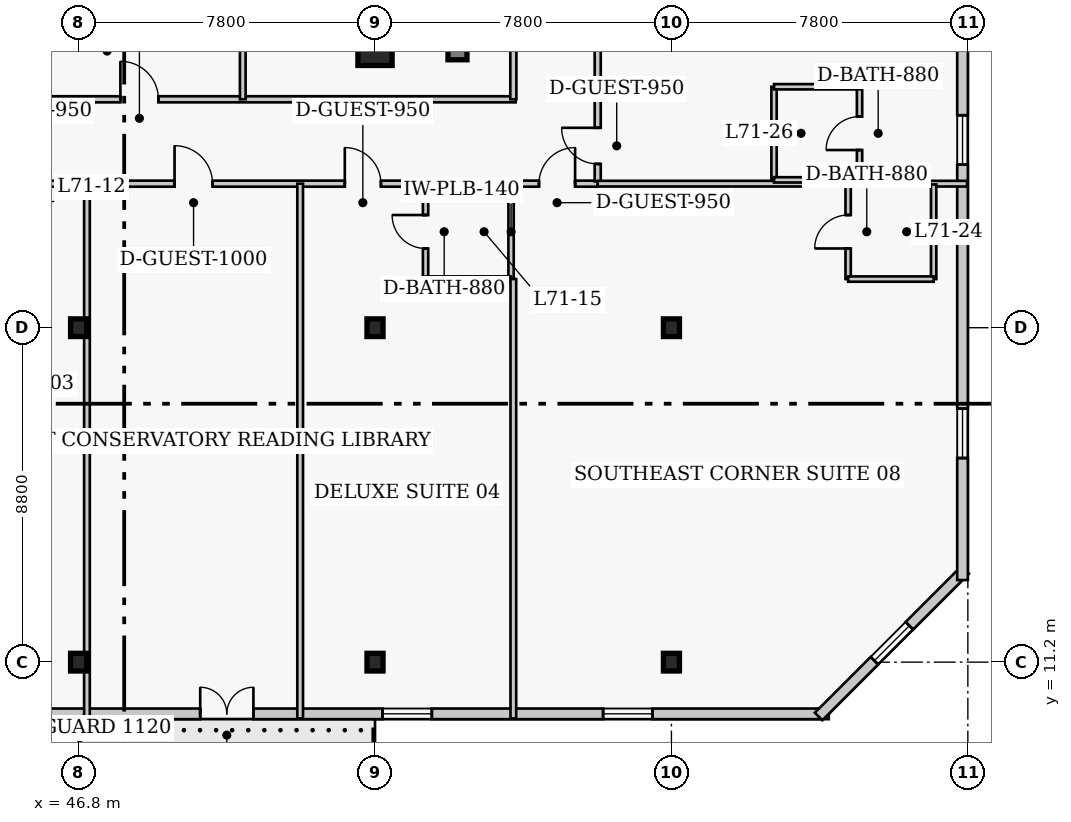
"""IFC4 building model, lengths in metres.
Left out: names, types, materials, properties, quantities, classifications, styles, units other than length and angle.
Written with IfcOpenShell. Run it as: python <this file> out.ifc"""

import sys

from ifc_helpers import new_model, si_unit, direction, frame, frame_2d, origin, origin_2d, place, context, subcontext, project, spatial, rectangle, i_section, extrude, element, fill, save


model = new_model("IFC4")
c1 = context("Model", 3, precision=1e-05, world=origin(), true_north=direction((0.0, 1.0)))
c2 = subcontext(c1, "Body", "Model", "MODEL_VIEW")
j1 = project(units=[si_unit("LENGTHUNIT", "METRE"), si_unit("PLANEANGLEUNIT", "RADIAN")], contexts=[c1])
p1 = place(None, origin())
s1 = spatial("IfcSite", under=j1, at=p1, CompositionType="ELEMENT")
p2 = place(p1, origin())
s2 = spatial("IfcBuilding", under=s1, at=p2, CompositionType="ELEMENT")
p3 = place(p2, frame((0.0, 0.0, 285.4)))
s3 = spatial("IfcBuildingStorey", under=s2, at=p3, CompositionType="ELEMENT", Elevation=285.4)
p4 = place(p3, frame((56.77, 27.05, 0.0), z_axis=(0.0, 0.0, 1.0), x_axis=(0.0, 1.0, 0.0)))
e1 = element("IfcWall", 1, at=p4, inside=s3, PredefinedType="SHEAR", context=c2, shape_type="SweptSolid", body=[
    extrude(rectangle(XDim=13.52, YDim=0.5, at=frame_2d((6.76, 0.0))), origin(), (0.0, 0.0, 1.0), 4.0),
])
for number, where, z_axis, x_axis in (
    (2, (46.8, 11.2, 0.0), (0.0, 0.0, 1.0), (1.0, 0.0, 0.0)),
    (3, (46.8, 20.0, 0.0), (0.0, 0.0, 1.0), (1.0, 0.0, 0.0)),
    (4, (54.6, 11.2, 0.0), (0.0, 0.0, 1.0), (1.0, 0.0, 0.0)),
    (5, (54.6, 20.0, 0.0), (0.0, 0.0, 1.0), (1.0, 0.0, 0.0)),
    (6, (62.4, 11.2, 0.0), (0.0, 0.0, 1.0), (1.0, 0.0, 0.0)),
    (7, (62.4, 20.0, 0.0), (0.0, 0.0, 1.0), (1.0, 0.0, 0.0)),
):
    element("IfcColumn", number, at=place(p3, frame(where, z_axis=z_axis, x_axis=x_axis)), inside=s3, PredefinedType="COLUMN", context=c2, shape_type="SweptSolid", body=[
        extrude(i_section(OverallWidth=0.422, OverallDepth=0.465, WebThickness=0.045, FlangeThickness=0.073, FilletRadius=0.017, at=origin_2d()), origin(), (0.0, 0.0, 1.0), 4.0),
    ])
p5 = place(p3, frame((54.6, 27.35, 0.0), z_axis=(0.0, 0.0, 1.0), x_axis=(1.0, 0.0, 0.0)))
e8 = element("IfcColumn", 8, at=p5, inside=s3, PredefinedType="COLUMN", context=c2, shape_type="SweptSolid", body=[
    extrude(rectangle(XDim=0.9, YDim=0.9, at=origin_2d()), origin(), (0.0, 0.0, 1.0), 4.0),
])
p6 = place(p3, frame((41.71, 9.84, 0.0), z_axis=(0.0, 0.0, 1.0), x_axis=(1.0, 0.0, 0.0)))
e9 = element("IfcWall", 9, at=p6, inside=s3, PredefinedType="SOLIDWALL", context=c2, shape_type="SweptSolid", body=[
    extrude(rectangle(XDim=24.83, YDim=0.28, at=frame_2d((12.415, 0.0))), origin(), (0.0, 0.0, 1.0), 3.76),
])
p7 = place(p6, frame((8.29, 0.0, 0.0)))
e10 = element("IfcOpeningElement", 10, at=p7, cuts=e9, PredefinedType="OPENING", context=c2, shape_type="SweptSolid", body=[
    extrude(rectangle(XDim=1.4, YDim=2.15, at=frame_2d((0.7, 1.075))), frame((0.0, 0.15, 0.0), z_axis=(0.0, -1.0, 0.0), x_axis=(1.0, 0.0, 0.0)), (0.0, 0.0, 1.0), 0.3),
])
p8 = place(p6, frame((2.838, 0.0, 0.85)))
e11 = element("IfcOpeningElement", 11, at=p8, cuts=e9, PredefinedType="OPENING", context=c2, shape_type="SweptSolid", body=[
    extrude(rectangle(XDim=1.3, YDim=1.7, at=frame_2d((0.65, 0.85))), frame((0.0, 0.15, 0.0), z_axis=(0.0, -1.0, 0.0), x_axis=(1.0, 0.0, 0.0)), (0.0, 0.0, 1.0), 0.3),
])
p9 = place(p6, frame((18.892, 0.0, 0.85)))
e12 = element("IfcOpeningElement", 12, at=p9, cuts=e9, PredefinedType="OPENING", context=c2, shape_type="SweptSolid", body=[
    extrude(rectangle(XDim=1.3, YDim=1.7, at=frame_2d((0.65, 0.85))), frame((0.0, 0.15, 0.0), z_axis=(0.0, -1.0, 0.0), x_axis=(1.0, 0.0, 0.0)), (0.0, 0.0, 1.0), 0.3),
])
p10 = place(p6, frame((13.085, 0.0, 0.85)))
e13 = element("IfcOpeningElement", 13, at=p10, cuts=e9, PredefinedType="OPENING", context=c2, shape_type="SweptSolid", body=[
    extrude(rectangle(XDim=1.3, YDim=1.7, at=frame_2d((0.65, 0.85))), frame((0.0, 0.15, 0.0), z_axis=(0.0, -1.0, 0.0), x_axis=(1.0, 0.0, 0.0)), (0.0, 0.0, 1.0), 0.3),
])
p11 = place(p3, frame((66.273, 9.771, 0.0), z_axis=(0.0, 0.0, 1.0), x_axis=(0.707129162587, 0.707084399077, 0.0)))
e14 = element("IfcWall", 14, at=p11, inside=s3, PredefinedType="SOLIDWALL", context=c2, shape_type="SweptSolid", body=[
    extrude(rectangle(XDim=5.454, YDim=0.28, at=frame_2d((2.727, 0.0))), origin(), (0.0, 0.0, 1.0), 3.76),
])
p12 = place(p11, frame((2.077, 0.0, 0.85)))
e15 = element("IfcOpeningElement", 15, at=p12, cuts=e14, PredefinedType="OPENING", context=c2, shape_type="SweptSolid", body=[
    extrude(rectangle(XDim=1.3, YDim=1.7, at=frame_2d((0.65, 0.85))), frame((0.0, 0.15, 0.0), z_axis=(0.0, -1.0, 0.0), x_axis=(1.0, 0.0, 0.0)), (0.0, 0.0, 1.0), 0.3),
])
p13 = place(p3, frame((70.06, 13.36, 0.0), z_axis=(0.0, 0.0, 1.0), x_axis=(0.0, 1.0, 0.0)))
e16 = element("IfcWall", 16, at=p13, inside=s3, PredefinedType="SOLIDWALL", context=c2, shape_type="SweptSolid", body=[
    extrude(rectangle(XDim=30.88, YDim=0.28, at=frame_2d((15.44, 0.0))), origin(), (0.0, 0.0, 1.0), 3.76),
])
p14 = place(p13, frame((3.21, 0.0, 0.85)))
e17 = element("IfcOpeningElement", 17, at=p14, cuts=e16, PredefinedType="OPENING", context=c2, shape_type="SweptSolid", body=[
    extrude(rectangle(XDim=1.3, YDim=1.7, at=frame_2d((0.65, 0.85))), frame((0.0, 0.15, 0.0), z_axis=(0.0, -1.0, 0.0), x_axis=(1.0, 0.0, 0.0)), (0.0, 0.0, 1.0), 0.3),
])
p15 = place(p13, frame((10.93, 0.0, 0.85)))
e18 = element("IfcOpeningElement", 18, at=p15, cuts=e16, PredefinedType="OPENING", context=c2, shape_type="SweptSolid", body=[
    extrude(rectangle(XDim=1.3, YDim=1.7, at=frame_2d((0.65, 0.85))), frame((0.0, 0.15, 0.0), z_axis=(0.0, -1.0, 0.0), x_axis=(1.0, 0.0, 0.0)), (0.0, 0.0, 1.0), 0.3),
])
p16 = place(p13, frame((18.65, 0.0, 0.85)))
e19 = element("IfcOpeningElement", 19, at=p16, cuts=e16, PredefinedType="OPENING", context=c2, shape_type="SweptSolid", body=[
    extrude(rectangle(XDim=1.3, YDim=1.7, at=frame_2d((0.65, 0.85))), frame((0.0, 0.15, 0.0), z_axis=(0.0, -1.0, 0.0), x_axis=(1.0, 0.0, 0.0)), (0.0, 0.0, 1.0), 0.3),
])
p17 = place(p13, frame((26.37, 0.0, 0.85)))
e20 = element("IfcOpeningElement", 20, at=p17, cuts=e16, PredefinedType="OPENING", context=c2, shape_type="SweptSolid", body=[
    extrude(rectangle(XDim=1.3, YDim=1.7, at=frame_2d((0.65, 0.85))), frame((0.0, 0.15, 0.0), z_axis=(0.0, -1.0, 0.0), x_axis=(1.0, 0.0, 0.0)), (0.0, 0.0, 1.0), 0.3),
])
p18 = place(p3, frame((35.85, 26.01, 0.0), z_axis=(0.0, 0.0, 1.0), x_axis=(1.0, 0.0, 0.0)))
e21 = element("IfcWall", 21, at=p18, inside=s3, PredefinedType="PARTITIONING", context=c2, shape_type="SweptSolid", body=[
    extrude(rectangle(XDim=22.45, YDim=0.16, at=frame_2d((11.225, 0.0))), origin(), (0.0, 0.0, 1.0), 3.76),
])
p19 = place(p18, frame((4.55, 0.0, 0.0)))
e22 = element("IfcOpeningElement", 22, at=p19, cuts=e21, PredefinedType="OPENING", context=c2, shape_type="SweptSolid", body=[
    extrude(rectangle(XDim=1.0, YDim=2.15, at=frame_2d((0.5, 1.075))), frame((0.0, 0.09, 0.0), z_axis=(0.0, -1.0, 0.0), x_axis=(1.0, 0.0, 0.0)), (0.0, 0.0, 1.0), 0.18),
])
p20 = place(p18, frame((12.05, 0.0, 0.0)))
e23 = element("IfcOpeningElement", 23, at=p20, cuts=e21, PredefinedType="OPENING", context=c2, shape_type="SweptSolid", body=[
    extrude(rectangle(XDim=1.0, YDim=2.15, at=frame_2d((0.5, 1.075))), frame((0.0, 0.09, 0.0), z_axis=(0.0, -1.0, 0.0), x_axis=(1.0, 0.0, 0.0)), (0.0, 0.0, 1.0), 0.18),
])
p21 = place(p3, frame((35.8, 23.79, 0.0), z_axis=(0.0, 0.0, 1.0), x_axis=(1.0, 0.0, 0.0)))
e24 = element("IfcWall", 24, at=p21, inside=s3, PredefinedType="PARTITIONING", context=c2, shape_type="SweptSolid", body=[
    extrude(rectangle(XDim=24.66, YDim=0.16, at=frame_2d((12.33, 0.0))), origin(), (0.0, 0.0, 1.0), 3.76),
])
p22 = place(p21, frame((0.88, 0.0, 0.0)))
e25 = element("IfcOpeningElement", 25, at=p22, cuts=e24, PredefinedType="OPENING", context=c2, shape_type="SweptSolid", body=[
    extrude(rectangle(XDim=0.95, YDim=2.1, at=frame_2d((0.475, 1.05))), frame((0.0, 0.09, 0.0), z_axis=(0.0, -1.0, 0.0), x_axis=(1.0, 0.0, 0.0)), (0.0, 0.0, 1.0), 0.18),
])
p23 = place(p21, frame((9.095, 0.0, 0.0)))
e26 = element("IfcOpeningElement", 26, at=p23, cuts=e24, PredefinedType="OPENING", context=c2, shape_type="SweptSolid", body=[
    extrude(rectangle(XDim=0.95, YDim=2.1, at=frame_2d((0.475, 1.05))), frame((0.0, 0.09, 0.0), z_axis=(0.0, -1.0, 0.0), x_axis=(1.0, 0.0, 0.0)), (0.0, 0.0, 1.0), 0.18),
])
p24 = place(p21, frame((13.525, 0.0, 0.0)))
e27 = element("IfcOpeningElement", 27, at=p24, cuts=e24, PredefinedType="OPENING", context=c2, shape_type="SweptSolid", body=[
    extrude(rectangle(XDim=1.0, YDim=2.15, at=frame_2d((0.5, 1.075))), frame((0.0, 0.09, 0.0), z_axis=(0.0, -1.0, 0.0), x_axis=(1.0, 0.0, 0.0)), (0.0, 0.0, 1.0), 0.18),
])
p25 = place(p21, frame((18.005, 0.0, 0.0)))
e28 = element("IfcOpeningElement", 28, at=p25, cuts=e24, PredefinedType="OPENING", context=c2, shape_type="SweptSolid", body=[
    extrude(rectangle(XDim=0.95, YDim=2.1, at=frame_2d((0.475, 1.05))), frame((0.0, 0.09, 0.0), z_axis=(0.0, -1.0, 0.0), x_axis=(1.0, 0.0, 0.0)), (0.0, 0.0, 1.0), 0.18),
])
p26 = place(p21, frame((23.115, 0.0, 0.0)))
e29 = element("IfcOpeningElement", 29, at=p26, cuts=e24, PredefinedType="OPENING", context=c2, shape_type="SweptSolid", body=[
    extrude(rectangle(XDim=0.95, YDim=2.1, at=frame_2d((0.475, 1.05))), frame((0.0, 0.09, 0.0), z_axis=(0.0, -1.0, 0.0), x_axis=(1.0, 0.0, 0.0)), (0.0, 0.0, 1.0), 0.18),
])
p27 = place(p3, frame((60.46, 23.85, 0.0), z_axis=(0.0, 0.0, 1.0), x_axis=(0.0, 1.0, 0.0)))
e30 = element("IfcWall", 30, at=p27, inside=s3, PredefinedType="PARTITIONING", context=c2, shape_type="SweptSolid", body=[
    extrude(rectangle(XDim=16.8, YDim=0.16, at=frame_2d((8.4, 0.0))), origin(), (0.0, 0.0, 1.0), 3.76),
])
p28 = place(p27, frame((0.46, 0.0, 0.0)))
e31 = element("IfcOpeningElement", 31, at=p28, cuts=e30, PredefinedType="OPENING", context=c2, shape_type="SweptSolid", body=[
    extrude(rectangle(XDim=0.95, YDim=2.1, at=frame_2d((0.475, 1.05))), frame((0.0, 0.09, 0.0), z_axis=(0.0, -1.0, 0.0), x_axis=(1.0, 0.0, 0.0)), (0.0, 0.0, 1.0), 0.18),
])
p29 = place(p27, frame((15.36, 0.0, 0.0)))
e32 = element("IfcOpeningElement", 32, at=p29, cuts=e30, PredefinedType="OPENING", context=c2, shape_type="SweptSolid", body=[
    extrude(rectangle(XDim=1.0, YDim=2.15, at=frame_2d((0.5, 1.075))), frame((0.0, 0.09, 0.0), z_axis=(0.0, -1.0, 0.0), x_axis=(1.0, 0.0, 0.0)), (0.0, 0.0, 1.0), 0.18),
])
p30 = place(p3, frame((58.24, 26.01, 0.0), z_axis=(0.0, 0.0, 1.0), x_axis=(0.0, 1.0, 0.0)))
e33 = element("IfcWall", 33, at=p30, inside=s3, PredefinedType="PARTITIONING", context=c2, shape_type="SweptSolid", body=[
    extrude(rectangle(XDim=14.64, YDim=0.16, at=frame_2d((7.32, 0.0))), origin(), (0.0, 0.0, 1.0), 3.76),
])
p31 = place(p3, frame((51.12, 26.01, 0.0), z_axis=(0.0, 0.0, 1.0), x_axis=(0.0, 1.0, 0.0)))
e34 = element("IfcWall", 34, at=p31, inside=s3, PredefinedType="PARTITIONING", context=c2, shape_type="SweptSolid", body=[
    extrude(rectangle(XDim=3.54, YDim=0.15, at=frame_2d((1.77, 0.0))), origin(), (0.0, 0.0, 1.0), 3.76),
])
p32 = place(p3, frame((47.02, 9.72, 0.0), z_axis=(0.0, 0.0, 1.0), x_axis=(0.0, 1.0, 0.0)))
e35 = element("IfcWall", 35, at=p32, inside=s3, PredefinedType="PARTITIONING", context=c2, shape_type="SweptSolid", body=[
    extrude(rectangle(XDim=14.07, YDim=0.15, at=frame_2d((7.035, 0.0))), origin(), (0.0, 0.0, 1.0), 3.064),
])
p33 = place(p3, frame((52.63, 9.72, 0.0), z_axis=(0.0, 0.0, 1.0), x_axis=(0.0, 1.0, 0.0)))
e36 = element("IfcWall", 36, at=p33, inside=s3, PredefinedType="PARTITIONING", context=c2, shape_type="SweptSolid", body=[
    extrude(rectangle(XDim=14.07, YDim=0.15, at=frame_2d((7.035, 0.0))), origin(), (0.0, 0.0, 1.0), 3.76),
])
p34 = place(p3, frame((55.93, 21.28, 0.0), z_axis=(0.0, 0.0, 1.0), x_axis=(0.0, 1.0, 0.0)))
e37 = element("IfcWall", 37, at=p34, inside=s3, PredefinedType="PLUMBINGWALL", context=c2, shape_type="SweptSolid", body=[
    extrude(rectangle(XDim=2.49, YDim=0.14, at=frame_2d((1.245, 0.0))), origin(), (0.0, 0.0, 1.0), 3.76),
])
p35 = place(p34, frame((0.805, 0.0, 0.0)))
e38 = element("IfcOpeningElement", 38, at=p35, cuts=e37, PredefinedType="OPENING", context=c2, shape_type="SweptSolid", body=[
    extrude(rectangle(XDim=0.88, YDim=2.05, at=frame_2d((0.44, 1.025))), frame((0.0, 0.08, 0.0), z_axis=(0.0, -1.0, 0.0), x_axis=(1.0, 0.0, 0.0)), (0.0, 0.0, 1.0), 0.16),
])
p36 = place(p3, frame((58.18, 21.28, 0.0), z_axis=(0.0, 0.0, 1.0), x_axis=(0.0, 1.0, 0.0)))
e39 = element("IfcWall", 39, at=p36, inside=s3, PredefinedType="PLUMBINGWALL", context=c2, shape_type="SweptSolid", body=[
    extrude(rectangle(XDim=2.49, YDim=0.14, at=frame_2d((1.245, 0.0))), origin(), (0.0, 0.0, 1.0), 3.76),
])
p37 = place(p3, frame((55.93, 21.28, 0.0), z_axis=(0.0, 0.0, 1.0), x_axis=(1.0, 0.0, 0.0)))
e40 = element("IfcWall", 40, at=p37, inside=s3, PredefinedType="PLUMBINGWALL", context=c2, shape_type="SweptSolid", body=[
    extrude(rectangle(XDim=2.25, YDim=0.14, at=frame_2d((1.125, 0.0))), origin(), (0.0, 0.0, 1.0), 3.76),
])
p38 = place(p3, frame((58.24, 9.72, 0.0), z_axis=(0.0, 0.0, 1.0), x_axis=(0.0, 1.0, 0.0)))
e41 = element("IfcWall", 41, at=p38, inside=s3, PredefinedType="PARTITIONING", context=c2, shape_type="SweptSolid", body=[
    extrude(rectangle(XDim=11.56, YDim=0.15, at=frame_2d((5.78, 0.0))), origin(), (0.0, 0.0, 1.0), 3.76),
])
p39 = place(p3, frame((60.46, 23.79, 0.0), z_axis=(0.0, 0.0, 1.0), x_axis=(1.0, 0.0, 0.0)))
e42 = element("IfcWall", 42, at=p39, inside=s3, PredefinedType="PARTITIONING", context=c2, shape_type="SweptSolid", body=[
    extrude(rectangle(XDim=9.72, YDim=0.15, at=frame_2d((4.86, 0.0))), origin(), (0.0, 0.0, 1.0), 3.76),
])
p40 = place(p3, frame((67.05, 21.28, 0.0), z_axis=(0.0, 0.0, 1.0), x_axis=(0.0, 1.0, 0.0)))
e43 = element("IfcWall", 43, at=p40, inside=s3, PredefinedType="PLUMBINGWALL", context=c2, shape_type="SweptSolid", body=[
    extrude(rectangle(XDim=2.49, YDim=0.14, at=frame_2d((1.245, 0.0))), origin(), (0.0, 0.0, 1.0), 3.76),
])
p41 = place(p40, frame((0.805, 0.0, 0.0)))
e44 = element("IfcOpeningElement", 44, at=p41, cuts=e43, PredefinedType="OPENING", context=c2, shape_type="SweptSolid", body=[
    extrude(rectangle(XDim=0.88, YDim=2.05, at=frame_2d((0.44, 1.025))), frame((0.0, 0.08, 0.0), z_axis=(0.0, -1.0, 0.0), x_axis=(1.0, 0.0, 0.0)), (0.0, 0.0, 1.0), 0.16),
])
p42 = place(p3, frame((69.3, 21.28, 0.0), z_axis=(0.0, 0.0, 1.0), x_axis=(0.0, 1.0, 0.0)))
e45 = element("IfcWall", 45, at=p42, inside=s3, PredefinedType="PLUMBINGWALL", context=c2, shape_type="SweptSolid", body=[
    extrude(rectangle(XDim=2.49, YDim=0.14, at=frame_2d((1.245, 0.0))), origin(), (0.0, 0.0, 1.0), 3.76),
])
p43 = place(p3, frame((67.05, 21.28, 0.0), z_axis=(0.0, 0.0, 1.0), x_axis=(1.0, 0.0, 0.0)))
e46 = element("IfcWall", 46, at=p43, inside=s3, PredefinedType="PLUMBINGWALL", context=c2, shape_type="SweptSolid", body=[
    extrude(rectangle(XDim=2.25, YDim=0.14, at=frame_2d((1.125, 0.0))), origin(), (0.0, 0.0, 1.0), 3.76),
])
p44 = place(p3, frame((65.1, 23.89, 0.0), z_axis=(0.0, 0.0, 1.0), x_axis=(0.0, 1.0, 0.0)))
e47 = element("IfcWall", 47, at=p44, inside=s3, PredefinedType="PLUMBINGWALL", context=c2, shape_type="SweptSolid", body=[
    extrude(rectangle(XDim=2.45, YDim=0.14, at=frame_2d((1.225, 0.0))), origin(), (0.0, 0.0, 1.0), 3.76),
])
p45 = place(p3, frame((67.35, 23.89, 0.0), z_axis=(0.0, 0.0, 1.0), x_axis=(0.0, 1.0, 0.0)))
e48 = element("IfcWall", 48, at=p45, inside=s3, PredefinedType="PLUMBINGWALL", context=c2, shape_type="SweptSolid", body=[
    extrude(rectangle(XDim=2.45, YDim=0.14, at=frame_2d((1.225, 0.0))), origin(), (0.0, 0.0, 1.0), 3.76),
])
p46 = place(p45, frame((0.785, 0.0, 0.0)))
e49 = element("IfcOpeningElement", 49, at=p46, cuts=e48, PredefinedType="OPENING", context=c2, shape_type="SweptSolid", body=[
    extrude(rectangle(XDim=0.88, YDim=2.05, at=frame_2d((0.44, 1.025))), frame((0.0, 0.08, 0.0), z_axis=(0.0, -1.0, 0.0), x_axis=(1.0, 0.0, 0.0)), (0.0, 0.0, 1.0), 0.16),
])
for number, where, z_axis, x_axis in (
    (50, (65.1, 23.89, 0.0), (0.0, 0.0, 1.0), (1.0, 0.0, 0.0)),
    (51, (65.1, 26.34, 0.0), (0.0, 0.0, 1.0), (1.0, 0.0, 0.0)),
):
    element("IfcWall", number, at=place(p3, frame(where, z_axis=z_axis, x_axis=x_axis)), inside=s3, PredefinedType="PLUMBINGWALL", context=c2, shape_type="SweptSolid", body=[
        extrude(rectangle(XDim=2.25, YDim=0.14, at=frame_2d((1.125, 0.0))), origin(), (0.0, 0.0, 1.0), 3.76),
    ])
p47 = place(p7, origin())
e52 = element("IfcDoor", 52, at=p47, inside=s3, OperationType="DOUBLE_DOOR_SINGLE_SWING", PredefinedType="DOOR", context=c2, shape_type="SweptSolid", body=[
    extrude(rectangle(XDim=1.4, YDim=2.15, at=frame_2d((0.7, 1.075))), frame((0.0, 0.025, 0.0), z_axis=(0.0, -1.0, 0.0), x_axis=(1.0, 0.0, 0.0)), (0.0, 0.0, 1.0), 0.05),
])
fill(e10, e52)
p48 = place(p9, origin())
e53 = element("IfcWindow", 53, at=p48, inside=s3, PartitioningType="SINGLE_PANEL", PredefinedType="WINDOW", context=c2, shape_type="SweptSolid", body=[
    extrude(rectangle(XDim=1.3, YDim=1.7, at=frame_2d((0.65, 0.85))), frame((0.0, 0.03, 0.0), z_axis=(0.0, -1.0, 0.0), x_axis=(1.0, 0.0, 0.0)), (0.0, 0.0, 1.0), 0.06),
])
fill(e12, e53)
p49 = place(p12, origin())
e54 = element("IfcWindow", 54, at=p49, inside=s3, PartitioningType="SINGLE_PANEL", PredefinedType="WINDOW", context=c2, shape_type="SweptSolid", body=[
    extrude(rectangle(XDim=1.3, YDim=1.7, at=frame_2d((0.65, 0.85))), frame((0.0, 0.03, 0.0), z_axis=(0.0, -1.0, 0.0), x_axis=(1.0, 0.0, 0.0)), (0.0, 0.0, 1.0), 0.06),
])
fill(e15, e54)
p50 = place(p14, origin())
e55 = element("IfcWindow", 55, at=p50, inside=s3, PartitioningType="SINGLE_PANEL", PredefinedType="WINDOW", context=c2, shape_type="SweptSolid", body=[
    extrude(rectangle(XDim=1.3, YDim=1.7, at=frame_2d((0.65, 0.85))), frame((0.0, 0.03, 0.0), z_axis=(0.0, -1.0, 0.0), x_axis=(1.0, 0.0, 0.0)), (0.0, 0.0, 1.0), 0.06),
])
fill(e17, e55)
p51 = place(p15, origin())
e56 = element("IfcWindow", 56, at=p51, inside=s3, PartitioningType="SINGLE_PANEL", PredefinedType="WINDOW", context=c2, shape_type="SweptSolid", body=[
    extrude(rectangle(XDim=1.3, YDim=1.7, at=frame_2d((0.65, 0.85))), frame((0.0, 0.03, 0.0), z_axis=(0.0, -1.0, 0.0), x_axis=(1.0, 0.0, 0.0)), (0.0, 0.0, 1.0), 0.06),
])
fill(e18, e56)
p52 = place(p10, origin())
e57 = element("IfcWindow", 57, at=p52, inside=s3, PartitioningType="SINGLE_PANEL", PredefinedType="WINDOW", context=c2, shape_type="SweptSolid", body=[
    extrude(rectangle(XDim=1.3, YDim=1.7, at=frame_2d((0.65, 0.85))), frame((0.0, 0.03, 0.0), z_axis=(0.0, -1.0, 0.0), x_axis=(1.0, 0.0, 0.0)), (0.0, 0.0, 1.0), 0.06),
])
fill(e13, e57)
p53 = place(p20, origin())
e58 = element("IfcDoor", 58, at=p53, inside=s3, OperationType="SINGLE_SWING_LEFT", PredefinedType="DOOR", context=c2, shape_type="SweptSolid", body=[
    extrude(rectangle(XDim=1.0, YDim=2.15, at=frame_2d((0.5, 1.075))), frame((0.0, 0.025, 0.0), z_axis=(0.0, -1.0, 0.0), x_axis=(1.0, 0.0, 0.0)), (0.0, 0.0, 1.0), 0.05),
])
fill(e23, e58)
p54 = place(p24, origin())
e59 = element("IfcDoor", 59, at=p54, inside=s3, OperationType="SINGLE_SWING_LEFT", PredefinedType="DOOR", context=c2, shape_type="SweptSolid", body=[
    extrude(rectangle(XDim=1.0, YDim=2.15, at=frame_2d((0.5, 1.075))), frame((0.0, 0.025, 0.0), z_axis=(0.0, -1.0, 0.0), x_axis=(1.0, 0.0, 0.0)), (0.0, 0.0, 1.0), 0.05),
])
fill(e27, e59)
p55 = place(p35, origin())
e60 = element("IfcDoor", 60, at=p55, inside=s3, OperationType="SINGLE_SWING_RIGHT", PredefinedType="DOOR", context=c2, shape_type="SweptSolid", body=[
    extrude(rectangle(XDim=0.88, YDim=2.05, at=frame_2d((0.44, 1.025))), frame((0.0, 0.025, 0.0), z_axis=(0.0, -1.0, 0.0), x_axis=(1.0, 0.0, 0.0)), (0.0, 0.0, 1.0), 0.05),
])
fill(e38, e60)
p56 = place(p25, origin())
e61 = element("IfcDoor", 61, at=p56, inside=s3, OperationType="SINGLE_SWING_LEFT", PredefinedType="DOOR", context=c2, shape_type="SweptSolid", body=[
    extrude(rectangle(XDim=0.95, YDim=2.1, at=frame_2d((0.475, 1.05))), frame((0.0, 0.025, 0.0), z_axis=(0.0, -1.0, 0.0), x_axis=(1.0, 0.0, 0.0)), (0.0, 0.0, 1.0), 0.05),
])
fill(e28, e61)
p57 = place(p41, origin())
e62 = element("IfcDoor", 62, at=p57, inside=s3, OperationType="SINGLE_SWING_LEFT", PredefinedType="DOOR", context=c2, shape_type="SweptSolid", body=[
    extrude(rectangle(XDim=0.88, YDim=2.05, at=frame_2d((0.44, 1.025))), frame((0.0, 0.025, 0.0), z_axis=(0.0, -1.0, 0.0), x_axis=(1.0, 0.0, 0.0)), (0.0, 0.0, 1.0), 0.05),
])
fill(e44, e62)
p58 = place(p26, origin())
e63 = element("IfcDoor", 63, at=p58, inside=s3, OperationType="SINGLE_SWING_RIGHT", PredefinedType="DOOR", context=c2, shape_type="SweptSolid", body=[
    extrude(rectangle(XDim=0.95, YDim=2.1, at=frame_2d((0.475, 1.05))), frame((0.0, 0.025, 0.0), z_axis=(0.0, -1.0, 0.0), x_axis=(1.0, 0.0, 0.0)), (0.0, 0.0, 1.0), 0.05),
])
fill(e29, e63)
p59 = place(p46, origin())
e64 = element("IfcDoor", 64, at=p59, inside=s3, OperationType="SINGLE_SWING_LEFT", PredefinedType="DOOR", context=c2, shape_type="SweptSolid", body=[
    extrude(rectangle(XDim=0.88, YDim=2.05, at=frame_2d((0.44, 1.025))), frame((0.0, 0.025, 0.0), z_axis=(0.0, -1.0, 0.0), x_axis=(1.0, 0.0, 0.0)), (0.0, 0.0, 1.0), 0.05),
])
fill(e49, e64)
p60 = place(p28, origin())
e65 = element("IfcDoor", 65, at=p60, inside=s3, OperationType="SINGLE_SWING_RIGHT", PredefinedType="DOOR", context=c2, shape_type="SweptSolid", body=[
    extrude(rectangle(XDim=0.95, YDim=2.1, at=frame_2d((0.475, 1.05))), frame((0.0, 0.025, 0.0), z_axis=(0.0, -1.0, 0.0), x_axis=(1.0, 0.0, 0.0)), (0.0, 0.0, 1.0), 0.05),
])
fill(e31, e65)
save(model, sys.argv[1])
